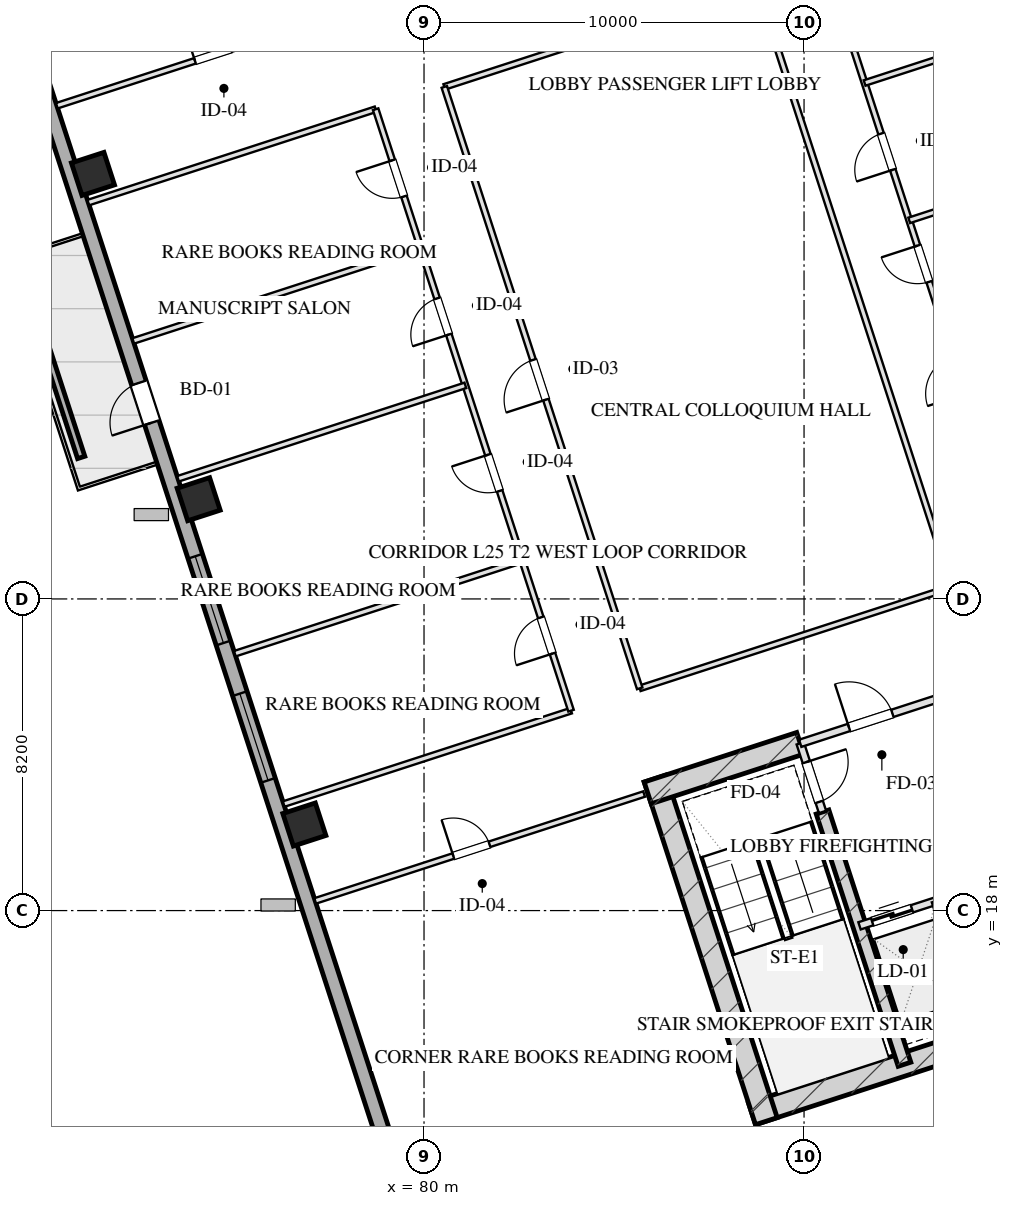
"""IFC4 building model, lengths in metres.
Left out: names, types, materials, properties, quantities, classifications, styles, units other than length and angle.
Written with IfcOpenShell. Run it as: python <this file> out.ifc"""

import sys

from ifc_helpers import new_model, si_unit, direction, frame, frame_2d, origin, origin_2d, place, context, subcontext, project, spatial, rectangle, hollow_rectangle, extrude, element, fill, save


model = new_model("IFC4")
c1 = context("Model", 3, precision=1e-05, world=origin(), true_north=direction((0.0, 1.0)))
c2 = subcontext(c1, "Body", "Model", "MODEL_VIEW")
j1 = project(units=[si_unit("LENGTHUNIT", "METRE"), si_unit("PLANEANGLEUNIT", "RADIAN")], contexts=[c1])
p1 = place(None, origin())
s1 = spatial("IfcSite", under=j1, at=p1, CompositionType="ELEMENT")
p2 = place(p1, origin())
s2 = spatial("IfcBuilding", under=s1, at=p2, CompositionType="ELEMENT")
p3 = place(p2, frame((0.0, 0.0, 100.05)))
s3 = spatial("IfcBuildingStorey", under=s2, at=p3, CompositionType="ELEMENT", Elevation=100.05)
p4 = place(p3, frame((88.63, 12.652, 0.0), z_axis=(0.0, 0.0, 1.0), x_axis=(0.95105714907, 0.309015046886, 0.0)))
e1 = element("IfcWall", 1, at=p4, inside=s3, PredefinedType="SHEAR", context=c2, shape_type="SweptSolid", body=[
    extrude(rectangle(XDim=16.4, YDim=0.6, at=frame_2d((8.2, 0.0))), origin(), (0.0, 0.0, 1.0), 3.45),
])
p5 = place(p3, frame((86.078, 21.475, 0.0), z_axis=(0.0, 0.0, 1.0), x_axis=(0.309017938678, -0.951056209472, 0.0)))
e2 = element("IfcWall", 2, at=p5, inside=s3, PredefinedType="SHEAR", context=c2, shape_type="SweptSolid", body=[
    extrude(rectangle(XDim=9.48, YDim=0.6, at=frame_2d((4.74, 0.0))), origin(), (0.0, 0.0, 1.0), 3.45),
])
p6 = place(p3, frame((90.486, 20.594, 0.0), z_axis=(0.0, 0.0, 1.0), x_axis=(0.309020428229, -0.951055400562, 0.0)))
e3 = element("IfcWall", 3, at=p6, inside=s3, PredefinedType="SHEAR", context=c2, shape_type="SweptSolid", body=[
    extrude(rectangle(XDim=6.98, YDim=0.35, at=frame_2d((3.49, 0.0))), origin(), (0.0, 0.0, 1.0), 3.45),
])
p7 = place(p3, frame((85.886, 21.097, 0.0), z_axis=(0.0, 0.0, 1.0), x_axis=(0.951068073652, 0.308981422225, 0.0)))
e4 = element("IfcWall", 4, at=p7, inside=s3, PredefinedType="SHEAR", context=c2, shape_type="SweptSolid", body=[
    extrude(rectangle(XDim=4.22, YDim=0.6, at=frame_2d((2.11, 0.0))), origin(), (0.0, 0.0, 1.0), 3.45),
])
for number, where, z_axis, x_axis in (
    (5, (76.851, 20.264, 0.0), (0.0, 0.0, 1.0), (0.951, 0.309, 0.0)),
    (6, (74.07, 28.824, 0.0), (0.0, 0.0, 1.0), (0.951, 0.309, 0.0)),
    (7, (71.289, 37.384, 0.0), (0.0, 0.0, 1.0), (0.951, 0.309, 0.0)),
):
    element("IfcColumn", number, at=place(p3, frame(where, z_axis=z_axis, x_axis=x_axis)), inside=s3, PredefinedType="COLUMN", context=c2, shape_type="SweptSolid", body=[
        extrude(hollow_rectangle(XDim=0.9, YDim=0.9, WallThickness=0.032, at=origin_2d()), origin(), (0.0, 0.0, 1.0), 3.451),
    ])
p8 = place(p3, frame((80.716, 6.59, 0.0), z_axis=(0.0, 0.0, 1.0), x_axis=(-0.309017542002, 0.95105633836, 0.0)))
e8 = element("IfcWall", 8, at=p8, inside=s3, PredefinedType="SOLIDWALL", context=c2, shape_type="SweptSolid", body=[
    extrude(rectangle(XDim=46.4, YDim=0.4, at=frame_2d((23.2, 0.0))), origin(), (0.0, 0.0, 1.0), 2.55),
])
p9 = place(p8, frame((15.6, 0.0, 0.75)))
e9 = element("IfcOpeningElement", 9, at=p9, cuts=e8, PredefinedType="OPENING", context=c2, shape_type="SweptSolid", body=[
    extrude(rectangle(XDim=2.4, YDim=1.4, at=frame_2d((1.2, 0.7))), frame((0.0, 0.21, 0.0), z_axis=(0.0, -1.0, 0.0), x_axis=(1.0, 0.0, 0.0)), (0.0, 0.0, 1.0), 0.42),
])
p10 = place(p8, frame((19.4, 0.0, 0.75)))
e10 = element("IfcOpeningElement", 10, at=p10, cuts=e8, PredefinedType="OPENING", context=c2, shape_type="SweptSolid", body=[
    extrude(rectangle(XDim=2.4, YDim=1.4, at=frame_2d((1.2, 0.7))), frame((0.0, 0.21, 0.0), z_axis=(0.0, -1.0, 0.0), x_axis=(1.0, 0.0, 0.0)), (0.0, 0.0, 1.0), 0.42),
])
p11 = place(p8, frame((25.496, 0.0, 0.0)))
e11 = element("IfcOpeningElement", 11, at=p11, cuts=e8, PredefinedType="OPENING", context=c2, shape_type="SweptSolid", body=[
    extrude(rectangle(XDim=1.1, YDim=2.15, at=frame_2d((0.55, 1.075))), frame((0.0, 0.21, 0.0), z_axis=(0.0, -1.0, 0.0), x_axis=(1.0, 0.0, 0.0)), (0.0, 0.0, 1.0), 0.42),
])
p12 = place(p3, frame((111.953, 14.005, 0.0), z_axis=(0.0, 0.0, 1.0), x_axis=(-0.95105505922, -0.309021478754, 0.0)))
e12 = element("IfcWall", 12, at=p12, inside=s3, PredefinedType="SOLIDWALL", context=c2, shape_type="SweptSolid", body=[
    extrude(rectangle(XDim=29.4, YDim=0.4, at=frame_2d((14.7, 0.0))), origin(), (0.0, 0.0, 1.0), 2.55),
])
p13 = place(p3, frame((70.979, 29.923, 0.0), z_axis=(0.0, 0.0, 1.0), x_axis=(-0.308986014439, 0.951066581729, 0.0)))
e13 = element("IfcWall", 13, at=p13, inside=s3, PredefinedType="PARAPET", context=c2, shape_type="SweptSolid", body=[
    extrude(rectangle(XDim=4.8, YDim=0.2, at=frame_2d((2.4, 0.0))), origin(), (0.0, 0.0, 1.0), 0.75),
])
p14 = place(p3, frame((89.899, 22.401, 0.0), z_axis=(0.0, 0.0, 1.0), x_axis=(0.308932062672, -0.951084108086, 0.0)))
e14 = element("IfcWall", 14, at=p14, inside=s3, PredefinedType="PARTITIONING", context=c2, shape_type="SweptSolid", body=[
    extrude(rectangle(XDim=1.9, YDim=0.2, at=frame_2d((0.95, 0.0))), origin(), (0.0, 0.0, 1.0), 3.155),
])
p15 = place(p14, frame((0.52, 0.0, 0.0)))
e15 = element("IfcOpeningElement", 15, at=p15, cuts=e14, PredefinedType="OPENING", context=c2, shape_type="SweptSolid", body=[
    extrude(rectangle(XDim=1.1, YDim=2.05, at=frame_2d((0.55, 1.025))), frame((0.0, 0.11, 0.0), z_axis=(0.0, -1.0, 0.0), x_axis=(1.0, 0.0, 0.0)), (0.0, 0.0, 1.0), 0.22),
])
p16 = place(p3, frame((89.899, 22.401, 0.0), z_axis=(0.0, 0.0, 1.0), x_axis=(0.951046716504, 0.309047153403, 0.0)))
e16 = element("IfcWall", 16, at=p16, inside=s3, PredefinedType="PARTITIONING", context=c2, shape_type="SweptSolid", body=[
    extrude(rectangle(XDim=3.83, YDim=0.2, at=frame_2d((1.915, 0.0))), origin(), (0.0, 0.0, 1.0), 3.155),
])
p17 = place(p16, frame((1.35, 0.0, 0.0)))
e17 = element("IfcOpeningElement", 17, at=p17, cuts=e16, PredefinedType="OPENING", context=c2, shape_type="SweptSolid", body=[
    extrude(rectangle(XDim=1.2, YDim=2.05, at=frame_2d((0.6, 1.025))), frame((0.0, 0.11, 0.0), z_axis=(0.0, -1.0, 0.0), x_axis=(1.0, 0.0, 0.0)), (0.0, 0.0, 1.0), 0.22),
])
p18 = place(p3, frame((91.46, 17.598, 0.0), z_axis=(0.0, 0.0, 1.0), x_axis=(0.951062257173, 0.308999325213, 0.0)))
e18 = element("IfcWall", 18, at=p18, inside=s3, PredefinedType="PARTITIONING", context=c2, shape_type="SweptSolid", body=[
    extrude(rectangle(XDim=2.1, YDim=0.2, at=frame_2d((1.05, 0.0))), origin(), (0.0, 0.0, 1.0), 3.155),
])
p19 = place(p18, frame((0.35, 0.0, 0.0)))
e19 = element("IfcOpeningElement", 19, at=p19, cuts=e18, PredefinedType="OPENING", context=c2, shape_type="SweptSolid", body=[
    extrude(rectangle(XDim=1.1, YDim=2.05, at=frame_2d((0.55, 1.025))), frame((0.0, 0.11, 0.0), z_axis=(0.0, -1.0, 0.0), x_axis=(1.0, 0.0, 0.0)), (0.0, 0.0, 1.0), 0.22),
])
p20 = place(p3, frame((93.457, 18.247, 0.0), z_axis=(0.0, 0.0, 1.0), x_axis=(0.3089935693, -0.951064127245, 0.0)))
e20 = element("IfcWall", 20, at=p20, inside=s3, PredefinedType="PARTITIONING", context=c2, shape_type="SweptSolid", body=[
    extrude(rectangle(XDim=3.7, YDim=0.2, at=frame_2d((1.85, 0.0))), origin(), (0.0, 0.0, 1.0), 3.155),
])
p21 = place(p3, frame((77.136, 18.254, 0.0), z_axis=(0.0, 0.0, 1.0), x_axis=(0.951057133767, 0.309015093986, 0.0)))
e21 = element("IfcWall", 21, at=p21, inside=s3, PredefinedType="PARTITIONING", context=c2, shape_type="SweptSolid", body=[
    extrude(rectangle(XDim=9.1, YDim=0.15, at=frame_2d((4.55, 0.0))), origin(), (0.0, 0.0, 1.0), 3.155),
])
p22 = place(p21, frame((3.822, 0.0, 0.0)))
e22 = element("IfcOpeningElement", 22, at=p22, cuts=e21, PredefinedType="OPENING", context=c2, shape_type="SweptSolid", body=[
    extrude(rectangle(XDim=1.0, YDim=2.05, at=frame_2d((0.5, 1.025))), frame((0.0, 0.085, 0.0), z_axis=(0.0, -1.0, 0.0), x_axis=(1.0, 0.0, 0.0)), (0.0, 0.0, 1.0), 0.17),
])
p23 = place(p3, frame((70.338, 39.177, 0.0), z_axis=(0.0, 0.0, 1.0), x_axis=(0.951059695568, 0.309007209409, 0.0)))
e23 = element("IfcWall", 23, at=p23, inside=s3, PredefinedType="PARTITIONING", context=c2, shape_type="SweptSolid", body=[
    extrude(rectangle(XDim=9.1, YDim=0.15, at=frame_2d((4.55, 0.0))), origin(), (0.0, 0.0, 1.0), 3.155),
])
p24 = place(p23, frame((3.822, 0.0, 0.0)))
e24 = element("IfcOpeningElement", 24, at=p24, cuts=e23, PredefinedType="OPENING", context=c2, shape_type="SweptSolid", body=[
    extrude(rectangle(XDim=1.0, YDim=2.05, at=frame_2d((0.5, 1.025))), frame((0.0, 0.085, 0.0), z_axis=(0.0, -1.0, 0.0), x_axis=(1.0, 0.0, 0.0)), (0.0, 0.0, 1.0), 0.17),
])
p25 = place(p3, frame((76.308, 20.803, 0.0), z_axis=(0.0, 0.0, 1.0), x_axis=(0.95105437725, 0.3090235776, 0.0)))
e25 = element("IfcWall", 25, at=p25, inside=s3, PredefinedType="PARTITIONING", context=c2, shape_type="SweptSolid", body=[
    extrude(rectangle(XDim=7.95, YDim=0.15, at=frame_2d((3.975, 0.0))), origin(), (0.0, 0.0, 1.0), 3.155),
])
p26 = place(p3, frame((85.676, 23.847, 0.0), z_axis=(0.0, 0.0, 1.0), x_axis=(0.951063309554, 0.308996086091, 0.0)))
e26 = element("IfcWall", 26, at=p26, inside=s3, PredefinedType="PARTITIONING", context=c2, shape_type="SweptSolid", body=[
    extrude(rectangle(XDim=8.65, YDim=0.15, at=frame_2d((4.325, 0.0))), origin(), (0.0, 0.0, 1.0), 3.155),
])
p27 = place(p3, frame((71.166, 36.629, 0.0), z_axis=(0.0, 0.0, 1.0), x_axis=(0.951060470027, 0.309004825775, 0.0)))
e27 = element("IfcWall", 27, at=p27, inside=s3, PredefinedType="PARTITIONING", context=c2, shape_type="SweptSolid", body=[
    extrude(rectangle(XDim=7.95, YDim=0.15, at=frame_2d((3.975, 0.0))), origin(), (0.0, 0.0, 1.0), 3.155),
])
p28 = place(p3, frame((80.534, 39.672, 0.0), z_axis=(0.0, 0.0, 1.0), x_axis=(0.951052319652, 0.309029910015, 0.0)))
e28 = element("IfcWall", 28, at=p28, inside=s3, PredefinedType="PARTITIONING", context=c2, shape_type="SweptSolid", body=[
    extrude(rectangle(XDim=8.65, YDim=0.15, at=frame_2d((4.325, 0.0))), origin(), (0.0, 0.0, 1.0), 3.155),
])
p29 = place(p3, frame((83.869, 23.26, 0.0), z_axis=(0.0, 0.0, 1.0), x_axis=(-0.309022042254, 0.951054876125, 0.0)))
e29 = element("IfcWall", 29, at=p29, inside=s3, PredefinedType="PARTITIONING", context=c2, shape_type="SweptSolid", body=[
    extrude(rectangle(XDim=16.64, YDim=0.15, at=frame_2d((8.32, 0.0))), origin(), (0.0, 0.0, 1.0), 3.155),
])
p30 = place(p29, frame((1.58, 0.0, 0.0)))
e30 = element("IfcOpeningElement", 30, at=p30, cuts=e29, PredefinedType="OPENING", context=c2, shape_type="SweptSolid", body=[
    extrude(rectangle(XDim=1.0, YDim=2.05, at=frame_2d((0.5, 1.025))), frame((0.0, 0.085, 0.0), z_axis=(0.0, -1.0, 0.0), x_axis=(1.0, 0.0, 0.0)), (0.0, 0.0, 1.0), 0.17),
])
p31 = place(p29, frame((6.08, 0.0, 0.0)))
e31 = element("IfcOpeningElement", 31, at=p31, cuts=e29, PredefinedType="OPENING", context=c2, shape_type="SweptSolid", body=[
    extrude(rectangle(XDim=1.0, YDim=2.05, at=frame_2d((0.5, 1.025))), frame((0.0, 0.085, 0.0), z_axis=(0.0, -1.0, 0.0), x_axis=(1.0, 0.0, 0.0)), (0.0, 0.0, 1.0), 0.17),
])
p32 = place(p29, frame((10.406, 0.0, 0.0)))
e32 = element("IfcOpeningElement", 32, at=p32, cuts=e29, PredefinedType="OPENING", context=c2, shape_type="SweptSolid", body=[
    extrude(rectangle(XDim=1.0, YDim=2.05, at=frame_2d((0.5, 1.025))), frame((0.0, 0.085, 0.0), z_axis=(0.0, -1.0, 0.0), x_axis=(1.0, 0.0, 0.0)), (0.0, 0.0, 1.0), 0.17),
])
p33 = place(p29, frame((14.226, 0.0, 0.0)))
e33 = element("IfcOpeningElement", 33, at=p33, cuts=e29, PredefinedType="OPENING", context=c2, shape_type="SweptSolid", body=[
    extrude(rectangle(XDim=1.0, YDim=2.05, at=frame_2d((0.5, 1.025))), frame((0.0, 0.085, 0.0), z_axis=(0.0, -1.0, 0.0), x_axis=(1.0, 0.0, 0.0)), (0.0, 0.0, 1.0), 0.17),
])
p34 = place(p3, frame((85.676, 23.847, 0.0), z_axis=(0.0, 0.0, 1.0), x_axis=(-0.309008771245, 0.951059188113, 0.0)))
e34 = element("IfcWall", 34, at=p34, inside=s3, PredefinedType="PARTITIONING", context=c2, shape_type="SweptSolid", body=[
    extrude(rectangle(XDim=16.64, YDim=0.15, at=frame_2d((8.32, 0.0))), origin(), (0.0, 0.0, 1.0), 3.155),
])
p35 = place(p34, frame((7.987, 0.0, 0.0)))
e35 = element("IfcOpeningElement", 35, at=p35, cuts=e34, PredefinedType="OPENING", context=c2, shape_type="SweptSolid", body=[
    extrude(rectangle(XDim=1.1, YDim=2.05, at=frame_2d((0.55, 1.025))), frame((0.0, 0.085, 0.0), z_axis=(0.0, -1.0, 0.0), x_axis=(1.0, 0.0, 0.0)), (0.0, 0.0, 1.0), 0.17),
])
p36 = place(p3, frame((93.903, 26.52, 0.0), z_axis=(0.0, 0.0, 1.0), x_axis=(-0.30901773025, 0.951056277195, 0.0)))
e36 = element("IfcWall", 36, at=p36, inside=s3, PredefinedType="PARTITIONING", context=c2, shape_type="SweptSolid", body=[
    extrude(rectangle(XDim=16.64, YDim=0.15, at=frame_2d((8.32, 0.0))), origin(), (0.0, 0.0, 1.0), 3.155),
])
p37 = place(p3, frame((95.709, 27.107, 0.0), z_axis=(0.0, 0.0, 1.0), x_axis=(-0.30901773025, 0.951056277195, 0.0)))
e37 = element("IfcWall", 37, at=p37, inside=s3, PredefinedType="PARTITIONING", context=c2, shape_type="SweptSolid", body=[
    extrude(rectangle(XDim=16.64, YDim=0.15, at=frame_2d((8.32, 0.0))), origin(), (0.0, 0.0, 1.0), 3.155),
])
p38 = place(p37, frame((1.164, 0.0, 0.0)))
e38 = element("IfcOpeningElement", 38, at=p38, cuts=e37, PredefinedType="OPENING", context=c2, shape_type="SweptSolid", body=[
    extrude(rectangle(XDim=1.0, YDim=2.05, at=frame_2d((0.5, 1.025))), frame((0.0, 0.085, 0.0), z_axis=(0.0, -1.0, 0.0), x_axis=(1.0, 0.0, 0.0)), (0.0, 0.0, 1.0), 0.17),
])
p39 = place(p37, frame((4.724, 0.0, 0.0)))
e39 = element("IfcOpeningElement", 39, at=p39, cuts=e37, PredefinedType="OPENING", context=c2, shape_type="SweptSolid", body=[
    extrude(rectangle(XDim=1.05, YDim=2.05, at=frame_2d((0.525, 1.025))), frame((0.0, 0.085, 0.0), z_axis=(0.0, -1.0, 0.0), x_axis=(1.0, 0.0, 0.0)), (0.0, 0.0, 1.0), 0.17),
])
p40 = place(p37, frame((7.82, 0.0, 0.0)))
e40 = element("IfcOpeningElement", 40, at=p40, cuts=e37, PredefinedType="OPENING", context=c2, shape_type="SweptSolid", body=[
    extrude(rectangle(XDim=1.0, YDim=2.05, at=frame_2d((0.5, 1.025))), frame((0.0, 0.085, 0.0), z_axis=(0.0, -1.0, 0.0), x_axis=(1.0, 0.0, 0.0)), (0.0, 0.0, 1.0), 0.17),
])
p41 = place(p37, frame((10.92, 0.0, 0.0)))
e41 = element("IfcOpeningElement", 41, at=p41, cuts=e37, PredefinedType="OPENING", context=c2, shape_type="SweptSolid", body=[
    extrude(rectangle(XDim=1.0, YDim=2.05, at=frame_2d((0.5, 1.025))), frame((0.0, 0.085, 0.0), z_axis=(0.0, -1.0, 0.0), x_axis=(1.0, 0.0, 0.0)), (0.0, 0.0, 1.0), 0.17),
])
p42 = place(p37, frame((14.48, 0.0, 0.0)))
e42 = element("IfcOpeningElement", 42, at=p42, cuts=e37, PredefinedType="OPENING", context=c2, shape_type="SweptSolid", body=[
    extrude(rectangle(XDim=1.0, YDim=2.05, at=frame_2d((0.5, 1.025))), frame((0.0, 0.085, 0.0), z_axis=(0.0, -1.0, 0.0), x_axis=(1.0, 0.0, 0.0)), (0.0, 0.0, 1.0), 0.17),
])
for number, where, z_axis, x_axis in (
    (43, (75.022, 24.76, 0.0), (0.0, 0.0, 1.0), (0.951, 0.309, 0.0)),
    (44, (73.527, 29.363, 0.0), (0.0, 0.0, 1.0), (0.951, 0.309, 0.0)),
    (45, (72.349, 32.989, 0.0), (0.0, 0.0, 1.0), (0.951, 0.309, 0.0)),
):
    element("IfcWall", number, at=place(p3, frame(where, z_axis=z_axis, x_axis=x_axis)), inside=s3, PredefinedType="PARTITIONING", context=c2, shape_type="SweptSolid", body=[
        extrude(rectangle(XDim=7.95, YDim=0.15, at=frame_2d((3.975, 0.0))), origin(), (0.0, 0.0, 1.0), 3.155),
    ])
p43 = place(p3, frame((92.768, 36.161, 0.0), z_axis=(0.0, 0.0, 1.0), x_axis=(0.951058377365, 0.309011266531, 0.0)))
e46 = element("IfcWall", 46, at=p43, inside=s3, PredefinedType="PARTITIONING", context=c2, shape_type="SweptSolid", body=[
    extrude(rectangle(XDim=13.8, YDim=0.15, at=frame_2d((6.9, 0.0))), origin(), (0.0, 0.0, 1.0), 3.155),
])
p44 = place(p3, frame((91.594, 39.775, 0.0), z_axis=(0.0, 0.0, 1.0), x_axis=(0.951056688031, 0.309016465825, 0.0)))
e47 = element("IfcWall", 47, at=p44, inside=s3, PredefinedType="PARTITIONING", context=c2, shape_type="SweptSolid", body=[
    extrude(rectangle(XDim=13.8, YDim=0.15, at=frame_2d((6.9, 0.0))), origin(), (0.0, 0.0, 1.0), 3.155),
])
p45 = place(p9, origin())
e48 = element("IfcWindow", 48, at=p45, inside=s3, PartitioningType="TRIPLE_PANEL_VERTICAL", PredefinedType="WINDOW", context=c2, shape_type="SweptSolid", body=[
    extrude(rectangle(XDim=2.4, YDim=1.4, at=frame_2d((1.2, 0.7))), frame((0.0, 0.03, 0.0), z_axis=(0.0, -1.0, 0.0), x_axis=(1.0, 0.0, 0.0)), (0.0, 0.0, 1.0), 0.06),
])
fill(e9, e48)
p46 = place(p10, origin())
e49 = element("IfcWindow", 49, at=p46, inside=s3, PartitioningType="TRIPLE_PANEL_VERTICAL", PredefinedType="WINDOW", context=c2, shape_type="SweptSolid", body=[
    extrude(rectangle(XDim=2.4, YDim=1.4, at=frame_2d((1.2, 0.7))), frame((0.0, 0.03, 0.0), z_axis=(0.0, -1.0, 0.0), x_axis=(1.0, 0.0, 0.0)), (0.0, 0.0, 1.0), 0.06),
])
fill(e10, e49)
p47 = place(p11, origin())
e50 = element("IfcDoor", 50, at=p47, inside=s3, OperationType="SINGLE_SWING_LEFT", PredefinedType="DOOR", context=c2, shape_type="SweptSolid", body=[
    extrude(rectangle(XDim=1.1, YDim=2.15, at=frame_2d((0.55, 1.075))), frame((0.0, 0.025, 0.0), z_axis=(0.0, -1.0, 0.0), x_axis=(1.0, 0.0, 0.0)), (0.0, 0.0, 1.0), 0.05),
])
fill(e11, e50)
p48 = place(p15, origin())
e51 = element("IfcDoor", 51, at=p48, inside=s3, OperationType="SINGLE_SWING_LEFT", PredefinedType="DOOR", context=c2, shape_type="SweptSolid", body=[
    extrude(rectangle(XDim=1.1, YDim=2.05, at=frame_2d((0.55, 1.025))), frame((0.0, 0.025, 0.0), z_axis=(0.0, -1.0, 0.0), x_axis=(1.0, 0.0, 0.0)), (0.0, 0.0, 1.0), 0.05),
])
fill(e15, e51)
p49 = place(p17, origin())
e52 = element("IfcDoor", 52, at=p49, inside=s3, OperationType="SINGLE_SWING_LEFT", PredefinedType="DOOR", context=c2, shape_type="SweptSolid", body=[
    extrude(rectangle(XDim=1.2, YDim=2.05, at=frame_2d((0.6, 1.025))), frame((0.0, 0.025, 0.0), z_axis=(0.0, -1.0, 0.0), x_axis=(1.0, 0.0, 0.0)), (0.0, 0.0, 1.0), 0.05),
])
fill(e17, e52)
p50 = place(p19, origin())
e53 = element("IfcDoor", 53, at=p50, inside=s3, OperationType="DOUBLE_DOOR_SLIDING", PredefinedType="DOOR", context=c2, shape_type="SweptSolid", body=[
    extrude(rectangle(XDim=1.1, YDim=2.05, at=frame_2d((0.55, 1.025))), frame((0.0, 0.025, 0.0), z_axis=(0.0, -1.0, 0.0), x_axis=(1.0, 0.0, 0.0)), (0.0, 0.0, 1.0), 0.05),
])
fill(e19, e53)
p51 = place(p22, origin())
e54 = element("IfcDoor", 54, at=p51, inside=s3, OperationType="SINGLE_SWING_LEFT", PredefinedType="DOOR", context=c2, shape_type="SweptSolid", body=[
    extrude(rectangle(XDim=1.0, YDim=2.05, at=frame_2d((0.5, 1.025))), frame((0.0, 0.025, 0.0), z_axis=(0.0, -1.0, 0.0), x_axis=(1.0, 0.0, 0.0)), (0.0, 0.0, 1.0), 0.05),
])
fill(e22, e54)
p52 = place(p24, origin())
e55 = element("IfcDoor", 55, at=p52, inside=s3, OperationType="SINGLE_SWING_LEFT", PredefinedType="DOOR", context=c2, shape_type="SweptSolid", body=[
    extrude(rectangle(XDim=1.0, YDim=2.05, at=frame_2d((0.5, 1.025))), frame((0.0, 0.025, 0.0), z_axis=(0.0, -1.0, 0.0), x_axis=(1.0, 0.0, 0.0)), (0.0, 0.0, 1.0), 0.05),
])
fill(e24, e55)
p53 = place(p30, origin())
e56 = element("IfcDoor", 56, at=p53, inside=s3, OperationType="SINGLE_SWING_LEFT", PredefinedType="DOOR", context=c2, shape_type="SweptSolid", body=[
    extrude(rectangle(XDim=1.0, YDim=2.05, at=frame_2d((0.5, 1.025))), frame((0.0, 0.025, 0.0), z_axis=(0.0, -1.0, 0.0), x_axis=(1.0, 0.0, 0.0)), (0.0, 0.0, 1.0), 0.05),
])
fill(e30, e56)
p54 = place(p31, origin())
e57 = element("IfcDoor", 57, at=p54, inside=s3, OperationType="SINGLE_SWING_RIGHT", PredefinedType="DOOR", context=c2, shape_type="SweptSolid", body=[
    extrude(rectangle(XDim=1.0, YDim=2.05, at=frame_2d((0.5, 1.025))), frame((0.0, 0.025, 0.0), z_axis=(0.0, -1.0, 0.0), x_axis=(1.0, 0.0, 0.0)), (0.0, 0.0, 1.0), 0.05),
])
fill(e31, e57)
p55 = place(p32, origin())
e58 = element("IfcDoor", 58, at=p55, inside=s3, OperationType="SINGLE_SWING_LEFT", PredefinedType="DOOR", context=c2, shape_type="SweptSolid", body=[
    extrude(rectangle(XDim=1.0, YDim=2.05, at=frame_2d((0.5, 1.025))), frame((0.0, 0.025, 0.0), z_axis=(0.0, -1.0, 0.0), x_axis=(1.0, 0.0, 0.0)), (0.0, 0.0, 1.0), 0.05),
])
fill(e32, e58)
p56 = place(p33, origin())
e59 = element("IfcDoor", 59, at=p56, inside=s3, OperationType="SINGLE_SWING_RIGHT", PredefinedType="DOOR", context=c2, shape_type="SweptSolid", body=[
    extrude(rectangle(XDim=1.0, YDim=2.05, at=frame_2d((0.5, 1.025))), frame((0.0, 0.025, 0.0), z_axis=(0.0, -1.0, 0.0), x_axis=(1.0, 0.0, 0.0)), (0.0, 0.0, 1.0), 0.05),
])
fill(e33, e59)
p57 = place(p35, origin())
e60 = element("IfcDoor", 60, at=p57, inside=s3, OperationType="SINGLE_SWING_LEFT", PredefinedType="DOOR", context=c2, shape_type="SweptSolid", body=[
    extrude(rectangle(XDim=1.1, YDim=2.05, at=frame_2d((0.55, 1.025))), frame((0.0, 0.025, 0.0), z_axis=(0.0, -1.0, 0.0), x_axis=(1.0, 0.0, 0.0)), (0.0, 0.0, 1.0), 0.05),
])
fill(e35, e60)
p58 = place(p40, origin())
e61 = element("IfcDoor", 61, at=p58, inside=s3, OperationType="SINGLE_SWING_RIGHT", PredefinedType="DOOR", context=c2, shape_type="SweptSolid", body=[
    extrude(rectangle(XDim=1.0, YDim=2.05, at=frame_2d((0.5, 1.025))), frame((0.0, 0.025, 0.0), z_axis=(0.0, -1.0, 0.0), x_axis=(1.0, 0.0, 0.0)), (0.0, 0.0, 1.0), 0.05),
])
fill(e40, e61)
p59 = place(p41, origin())
e62 = element("IfcDoor", 62, at=p59, inside=s3, OperationType="SINGLE_SWING_LEFT", PredefinedType="DOOR", context=c2, shape_type="SweptSolid", body=[
    extrude(rectangle(XDim=1.0, YDim=2.05, at=frame_2d((0.5, 1.025))), frame((0.0, 0.025, 0.0), z_axis=(0.0, -1.0, 0.0), x_axis=(1.0, 0.0, 0.0)), (0.0, 0.0, 1.0), 0.05),
])
fill(e41, e62)
save(model, sys.argv[1])
